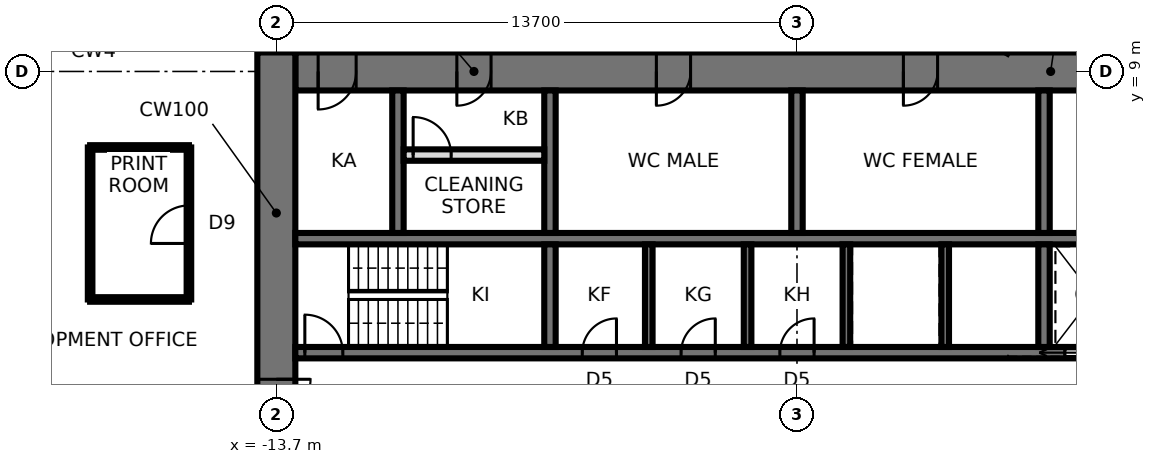
"""IFC4 building model, lengths in metres.
Left out: names, types, materials, properties, quantities, classifications, styles, units other than length and angle.
Written with IfcOpenShell. Run it as: python <this file> out.ifc"""

import sys

from ifc_helpers import new_model, si_unit, direction, frame, frame_2d, origin, place, context, subcontext, project, spatial, rectangle, extrude, element, fill, save


model = new_model("IFC4")
c1 = context("Model", 3, precision=1e-05, world=origin(), true_north=direction((0.0, 1.0)))
c2 = subcontext(c1, "Body", "Model", "MODEL_VIEW")
j1 = project(units=[si_unit("LENGTHUNIT", "METRE"), si_unit("PLANEANGLEUNIT", "RADIAN")], contexts=[c1])
p1 = place(None, origin())
s1 = spatial("IfcSite", under=j1, at=p1, CompositionType="ELEMENT")
p2 = place(p1, origin())
s2 = spatial("IfcBuilding", under=s1, at=p2, CompositionType="ELEMENT")
p3 = place(p2, frame((0.0, 0.0, 135.3)))
s3 = spatial("IfcBuildingStorey", under=s2, at=p3, CompositionType="ELEMENT", Elevation=135.3)
p4 = place(p3, frame((13.2, 9.0, 0.0), z_axis=(0.0, 0.0, 1.0), x_axis=(-1.0, 0.0, 0.0)))
e1 = element("IfcWall", 1, at=p4, inside=s3, PredefinedType="SHEAR", context=c2, shape_type="SweptSolid", body=[
    extrude(rectangle(XDim=26.4, YDim=1.0, at=frame_2d((13.2, 0.0))), origin(), (0.0, 0.0, 1.0), 3.9),
])
p5 = place(p4, frame((2.65, 0.0, 0.0)))
e2 = element("IfcOpeningElement", 2, at=p5, cuts=e1, PredefinedType="OPENING", context=c2, shape_type="SweptSolid", body=[
    extrude(rectangle(XDim=0.9, YDim=2.1, at=frame_2d((0.45, 1.05))), frame((0.0, 0.51, 0.0), z_axis=(0.0, -1.0, 0.0), x_axis=(1.0, 0.0, 0.0)), (0.0, 0.0, 1.0), 1.02),
])
p6 = place(p4, frame((9.5, 0.0, 0.0)))
e3 = element("IfcOpeningElement", 3, at=p6, cuts=e1, PredefinedType="OPENING", context=c2, shape_type="SweptSolid", body=[
    extrude(rectangle(XDim=0.9, YDim=2.1, at=frame_2d((0.45, 1.05))), frame((0.0, 0.51, 0.0), z_axis=(0.0, -1.0, 0.0), x_axis=(1.0, 0.0, 0.0)), (0.0, 0.0, 1.0), 1.02),
])
p7 = place(p4, frame((16.0, 0.0, 0.0)))
e4 = element("IfcOpeningElement", 4, at=p7, cuts=e1, PredefinedType="OPENING", context=c2, shape_type="SweptSolid", body=[
    extrude(rectangle(XDim=0.9, YDim=2.1, at=frame_2d((0.45, 1.05))), frame((0.0, 0.51, 0.0), z_axis=(0.0, -1.0, 0.0), x_axis=(1.0, 0.0, 0.0)), (0.0, 0.0, 1.0), 1.02),
])
p8 = place(p4, frame((21.25, 0.0, 0.0)))
e5 = element("IfcOpeningElement", 5, at=p8, cuts=e1, PredefinedType="OPENING", context=c2, shape_type="SweptSolid", body=[
    extrude(rectangle(XDim=0.9, YDim=2.1, at=frame_2d((0.45, 1.05))), frame((0.0, 0.51, 0.0), z_axis=(0.0, -1.0, 0.0), x_axis=(1.0, 0.0, 0.0)), (0.0, 0.0, 1.0), 1.02),
])
p9 = place(p4, frame((24.8, 0.0, 0.0)))
e6 = element("IfcOpeningElement", 6, at=p9, cuts=e1, PredefinedType="OPENING", context=c2, shape_type="SweptSolid", body=[
    extrude(rectangle(XDim=1.0, YDim=2.1, at=frame_2d((0.5, 1.05))), frame((0.0, 0.51, 0.0), z_axis=(0.0, -1.0, 0.0), x_axis=(1.0, 0.0, 0.0)), (0.0, 0.0, 1.0), 1.02),
])
p10 = place(p3, frame((-13.7, 9.5, 0.0), z_axis=(0.0, 0.0, 1.0), x_axis=(0.0, -1.0, 0.0)))
e7 = element("IfcWall", 7, at=p10, inside=s3, PredefinedType="SHEAR", context=c2, shape_type="SweptSolid", body=[
    extrude(rectangle(XDim=19.0, YDim=1.0, at=frame_2d((9.5, 0.0))), origin(), (0.0, 0.0, 1.0), 3.9),
])
p11 = place(p10, frame((8.6, 0.0, 0.0)))
e8 = element("IfcOpeningElement", 8, at=p11, cuts=e7, PredefinedType="OPENING", context=c2, shape_type="SweptSolid", body=[
    extrude(rectangle(XDim=1.8, YDim=2.4, at=frame_2d((0.9, 1.2))), frame((0.0, 0.51, 0.0), z_axis=(0.0, -1.0, 0.0), x_axis=(1.0, 0.0, 0.0)), (0.0, 0.0, 1.0), 1.02),
])
p12 = place(p3, frame((-13.2, 1.6, 0.0), z_axis=(0.0, 0.0, 1.0), x_axis=(1.0, 0.0, 0.0)))
e9 = element("IfcWall", 9, at=p12, inside=s3, PredefinedType="SHEAR", context=c2, shape_type="SweptSolid", body=[
    extrude(rectangle(XDim=26.4, YDim=0.3, at=frame_2d((13.2, 0.0))), origin(), (0.0, 0.0, 1.0), 3.9),
])
p13 = place(p12, frame((0.25, 0.0, 0.0)))
e10 = element("IfcOpeningElement", 10, at=p13, cuts=e9, PredefinedType="OPENING", context=c2, shape_type="SweptSolid", body=[
    extrude(rectangle(XDim=1.0, YDim=2.1, at=frame_2d((0.5, 1.05))), frame((0.0, 0.16, 0.0), z_axis=(0.0, -1.0, 0.0), x_axis=(1.0, 0.0, 0.0)), (0.0, 0.0, 1.0), 0.32),
])
p14 = place(p12, frame((20.25, 0.0, 0.0)))
e11 = element("IfcOpeningElement", 11, at=p14, cuts=e9, PredefinedType="OPENING", context=c2, shape_type="SweptSolid", body=[
    extrude(rectangle(XDim=1.5, YDim=2.4, at=frame_2d((0.75, 1.2))), frame((0.0, 0.16, 0.0), z_axis=(0.0, -1.0, 0.0), x_axis=(1.0, 0.0, 0.0)), (0.0, 0.0, 1.0), 0.32),
])
p15 = place(p12, frame((7.55, 0.0, 0.0)))
e12 = element("IfcOpeningElement", 12, at=p15, cuts=e9, PredefinedType="OPENING", context=c2, shape_type="SweptSolid", body=[
    extrude(rectangle(XDim=0.9, YDim=2.1, at=frame_2d((0.45, 1.05))), frame((0.0, 0.16, 0.0), z_axis=(0.0, -1.0, 0.0), x_axis=(1.0, 0.0, 0.0)), (0.0, 0.0, 1.0), 0.32),
])
p16 = place(p12, frame((10.15, 0.0, 0.0)))
e13 = element("IfcOpeningElement", 13, at=p16, cuts=e9, PredefinedType="OPENING", context=c2, shape_type="SweptSolid", body=[
    extrude(rectangle(XDim=0.9, YDim=2.1, at=frame_2d((0.45, 1.05))), frame((0.0, 0.16, 0.0), z_axis=(0.0, -1.0, 0.0), x_axis=(1.0, 0.0, 0.0)), (0.0, 0.0, 1.0), 0.32),
])
p17 = place(p12, frame((12.75, 0.0, 0.0)))
e14 = element("IfcOpeningElement", 14, at=p17, cuts=e9, PredefinedType="OPENING", context=c2, shape_type="SweptSolid", body=[
    extrude(rectangle(XDim=0.9, YDim=2.1, at=frame_2d((0.45, 1.05))), frame((0.0, 0.16, 0.0), z_axis=(0.0, -1.0, 0.0), x_axis=(1.0, 0.0, 0.0)), (0.0, 0.0, 1.0), 0.32),
])
p18 = place(p12, frame((24.15, 0.0, 0.0)))
e15 = element("IfcOpeningElement", 15, at=p18, cuts=e9, PredefinedType="OPENING", context=c2, shape_type="SweptSolid", body=[
    extrude(rectangle(XDim=0.9, YDim=2.1, at=frame_2d((0.45, 1.05))), frame((0.0, 0.16, 0.0), z_axis=(0.0, -1.0, 0.0), x_axis=(1.0, 0.0, 0.0)), (0.0, 0.0, 1.0), 0.32),
])
p19 = place(p3, frame((-13.2, 4.6, 0.0), z_axis=(0.0, 0.0, 1.0), x_axis=(1.0, 0.0, 0.0)))
e16 = element("IfcWall", 16, at=p19, inside=s3, PredefinedType="SHEAR", context=c2, shape_type="SweptSolid", body=[
    extrude(rectangle(XDim=26.4, YDim=0.3, at=frame_2d((13.2, 0.0))), origin(), (0.0, 0.0, 1.0), 3.9),
])
p20 = place(p3, frame((-6.5, 1.75, 0.0), z_axis=(0.0, 0.0, 1.0), x_axis=(0.0, 1.0, 0.0)))
e17 = element("IfcWall", 17, at=p20, inside=s3, PredefinedType="SHEAR", context=c2, shape_type="SweptSolid", body=[
    extrude(rectangle(XDim=2.7, YDim=0.3, at=frame_2d((1.35, 0.0))), origin(), (0.0, 0.0, 1.0), 3.9),
])
p21 = place(p3, frame((-6.5, 4.75, 0.0), z_axis=(0.0, 0.0, 1.0), x_axis=(0.0, 1.0, 0.0)))
e18 = element("IfcWall", 18, at=p21, inside=s3, PredefinedType="SHEAR", context=c2, shape_type="SweptSolid", body=[
    extrude(rectangle(XDim=3.75, YDim=0.3, at=frame_2d((1.875, 0.0))), origin(), (0.0, 0.0, 1.0), 3.9),
])
p22 = place(p3, frame((6.5, 1.75, 0.0), z_axis=(0.0, 0.0, 1.0), x_axis=(0.0, 1.0, 0.0)))
e19 = element("IfcWall", 19, at=p22, inside=s3, PredefinedType="SHEAR", context=c2, shape_type="SweptSolid", body=[
    extrude(rectangle(XDim=2.7, YDim=0.3, at=frame_2d((1.35, 0.0))), origin(), (0.0, 0.0, 1.0), 3.9),
])
p23 = place(p3, frame((6.5, 4.75, 0.0), z_axis=(0.0, 0.0, 1.0), x_axis=(0.0, 1.0, 0.0)))
e20 = element("IfcWall", 20, at=p23, inside=s3, PredefinedType="SHEAR", context=c2, shape_type="SweptSolid", body=[
    extrude(rectangle(XDim=3.75, YDim=0.3, at=frame_2d((1.875, 0.0))), origin(), (0.0, 0.0, 1.0), 3.9),
])
for number, where, z_axis, x_axis in (
    (21, (-3.9, 1.75, 0.0), (0.0, 0.0, 1.0), (0.0, 1.0, 0.0)),
    (22, (-1.3, 1.75, 0.0), (0.0, 0.0, 1.0), (0.0, 1.0, 0.0)),
    (23, (1.3, 1.75, 0.0), (0.0, 0.0, 1.0), (0.0, 1.0, 0.0)),
    (24, (3.9, 1.75, 0.0), (0.0, 0.0, 1.0), (0.0, 1.0, 0.0)),
):
    element("IfcWall", number, at=place(p3, frame(where, z_axis=z_axis, x_axis=x_axis)), inside=s3, PredefinedType="SHEAR", context=c2, shape_type="SweptSolid", body=[
        extrude(rectangle(XDim=2.7, YDim=0.2, at=frame_2d((1.35, 0.0))), origin(), (0.0, 0.0, 1.0), 3.9),
    ])
for number, where, z_axis, x_axis in (
    (25, (0.0, 4.75, 0.0), (0.0, 0.0, 1.0), (0.0, 1.0, 0.0)),
    (26, (-10.5, 4.75, 0.0), (0.0, 0.0, 1.0), (0.0, 1.0, 0.0)),
):
    element("IfcWall", number, at=place(p3, frame(where, z_axis=z_axis, x_axis=x_axis)), inside=s3, PredefinedType="SHEAR", context=c2, shape_type="SweptSolid", body=[
        extrude(rectangle(XDim=3.75, YDim=0.3, at=frame_2d((1.875, 0.0))), origin(), (0.0, 0.0, 1.0), 3.9),
    ])
p24 = place(p3, frame((-10.35, 6.8, 0.0), z_axis=(0.0, 0.0, 1.0), x_axis=(1.0, 0.0, 0.0)))
e27 = element("IfcWall", 27, at=p24, inside=s3, PredefinedType="PARTITIONING", context=c2, shape_type="SweptSolid", body=[
    extrude(rectangle(XDim=3.7, YDim=0.3, at=frame_2d((1.85, 0.0))), origin(), (0.0, 0.0, 1.0), 3.74),
])
p25 = place(p24, frame((0.25, 0.0, 0.0)))
e28 = element("IfcOpeningElement", 28, at=p25, cuts=e27, PredefinedType="OPENING", context=c2, shape_type="SweptSolid", body=[
    extrude(rectangle(XDim=1.0, YDim=2.4, at=frame_2d((0.5, 1.2))), frame((0.0, 0.16, 0.0), z_axis=(0.0, -1.0, 0.0), x_axis=(1.0, 0.0, 0.0)), (0.0, 0.0, 1.0), 0.32),
])
p26 = place(p3, frame((6.524, 11.3, 0.0), z_axis=(0.0, 0.0, 1.0), x_axis=(-0.499929208183, -0.866066271601, 0.0)))
e29 = element("IfcWall", 29, at=p26, inside=s3, PredefinedType="PARTITIONING", context=c2, shape_type="SweptSolid", body=[
    extrude(rectangle(XDim=2.078, YDim=0.12, at=frame_2d((1.039, 0.0))), origin(), (0.0, 0.0, 1.0), 3.74),
])
p27 = place(p3, frame((-18.6, 7.0, 0.0), z_axis=(0.0, 0.0, 1.0), x_axis=(1.0, 0.0, 0.0)))
e30 = element("IfcWall", 30, at=p27, inside=s3, PredefinedType="PARTITIONING", context=c2, shape_type="SweptSolid", body=[
    extrude(rectangle(XDim=2.6, YDim=0.12, at=frame_2d((1.3, 0.0))), origin(), (0.0, 0.0, 1.0), 3.74),
])
p28 = place(p3, frame((-16.0, 7.0, 0.0), z_axis=(0.0, 0.0, 1.0), x_axis=(0.0, -1.0, 0.0)))
e31 = element("IfcWall", 31, at=p28, inside=s3, PredefinedType="PARTITIONING", context=c2, shape_type="SweptSolid", body=[
    extrude(rectangle(XDim=4.0, YDim=0.12, at=frame_2d((2.0, 0.0))), origin(), (0.0, 0.0, 1.0), 3.74),
])
p29 = place(p28, frame((1.526, 0.0, 0.0)))
e32 = element("IfcOpeningElement", 32, at=p29, cuts=e31, PredefinedType="OPENING", context=c2, shape_type="SweptSolid", body=[
    extrude(rectangle(XDim=1.0, YDim=2.4, at=frame_2d((0.5, 1.2))), frame((0.0, 0.07, 0.0), z_axis=(0.0, -1.0, 0.0), x_axis=(1.0, 0.0, 0.0)), (0.0, 0.0, 1.0), 0.14),
])
p30 = place(p3, frame((-18.6, 3.0, 0.0), z_axis=(0.0, 0.0, 1.0), x_axis=(0.0, 1.0, 0.0)))
e33 = element("IfcWall", 33, at=p30, inside=s3, PredefinedType="PARTITIONING", context=c2, shape_type="SweptSolid", body=[
    extrude(rectangle(XDim=4.0, YDim=0.12, at=frame_2d((2.0, 0.0))), origin(), (0.0, 0.0, 1.0), 3.286),
])
p31 = place(p3, frame((-16.0, 3.0, 0.0), z_axis=(0.0, 0.0, 1.0), x_axis=(-1.0, 0.0, 0.0)))
e34 = element("IfcWall", 34, at=p31, inside=s3, PredefinedType="PARTITIONING", context=c2, shape_type="SweptSolid", body=[
    extrude(rectangle(XDim=2.6, YDim=0.12, at=frame_2d((1.3, 0.0))), origin(), (0.0, 0.0, 1.0), 3.74),
])
p32 = place(p11, origin())
e35 = element("IfcDoor", 35, at=p32, inside=s3, OperationType="DOUBLE_DOOR_SINGLE_SWING", PredefinedType="DOOR", context=c2, shape_type="SweptSolid", body=[
    extrude(rectangle(XDim=1.72, YDim=2.36, at=frame_2d((0.9, 1.18))), frame((0.0, 0.025, 0.0), z_axis=(0.0, -1.0, 0.0), x_axis=(1.0, 0.0, 0.0)), (0.0, 0.0, 1.0), 0.05),
    extrude(rectangle(XDim=0.04, YDim=2.4, at=frame_2d((0.02, 1.2))), frame((0.0, 0.25, 0.0), z_axis=(0.0, -1.0, 0.0), x_axis=(1.0, 0.0, 0.0)), (0.0, 0.0, 1.0), 0.5),
    extrude(rectangle(XDim=0.04, YDim=2.4, at=frame_2d((1.78, 1.2))), frame((0.0, 0.25, 0.0), z_axis=(0.0, -1.0, 0.0), x_axis=(1.0, 0.0, 0.0)), (0.0, 0.0, 1.0), 0.5),
    extrude(rectangle(XDim=1.72, YDim=0.04, at=frame_2d((0.9, 2.38))), frame((0.0, 0.25, 0.0), z_axis=(0.0, -1.0, 0.0), x_axis=(1.0, 0.0, 0.0)), (0.0, 0.0, 1.0), 0.5),
])
fill(e8, e35)
p33 = place(p13, origin())
e36 = element("IfcDoor", 36, at=p33, inside=s3, OperationType="SINGLE_SWING_LEFT", PredefinedType="DOOR", context=c2, shape_type="SweptSolid", body=[
    extrude(rectangle(XDim=1.0, YDim=2.1, at=frame_2d((0.5, 1.05))), frame((0.0, 0.025, 0.0), z_axis=(0.0, -1.0, 0.0), x_axis=(1.0, 0.0, 0.0)), (0.0, 0.0, 1.0), 0.05),
])
fill(e10, e36)
p34 = place(p14, origin())
e37 = element("IfcDoor", 37, at=p34, inside=s3, OperationType="SLIDING_TO_LEFT", PredefinedType="DOOR", context=c2, shape_type="SweptSolid", body=[
    extrude(rectangle(XDim=1.5, YDim=2.4, at=frame_2d((0.75, 1.2))), frame((0.0, 0.025, 0.0), z_axis=(0.0, -1.0, 0.0), x_axis=(1.0, 0.0, 0.0)), (0.0, 0.0, 1.0), 0.05),
])
fill(e11, e37)
p35 = place(p15, origin())
e38 = element("IfcDoor", 38, at=p35, inside=s3, OperationType="SINGLE_SWING_RIGHT", PredefinedType="DOOR", context=c2, shape_type="SweptSolid", body=[
    extrude(rectangle(XDim=0.9, YDim=2.1, at=frame_2d((0.45, 1.05))), frame((0.0, 0.025, 0.0), z_axis=(0.0, -1.0, 0.0), x_axis=(1.0, 0.0, 0.0)), (0.0, 0.0, 1.0), 0.05),
])
fill(e12, e38)
p36 = place(p16, origin())
e39 = element("IfcDoor", 39, at=p36, inside=s3, OperationType="SINGLE_SWING_RIGHT", PredefinedType="DOOR", context=c2, shape_type="SweptSolid", body=[
    extrude(rectangle(XDim=0.9, YDim=2.1, at=frame_2d((0.45, 1.05))), frame((0.0, 0.025, 0.0), z_axis=(0.0, -1.0, 0.0), x_axis=(1.0, 0.0, 0.0)), (0.0, 0.0, 1.0), 0.05),
])
fill(e13, e39)
p37 = place(p17, origin())
e40 = element("IfcDoor", 40, at=p37, inside=s3, OperationType="SINGLE_SWING_RIGHT", PredefinedType="DOOR", context=c2, shape_type="SweptSolid", body=[
    extrude(rectangle(XDim=0.9, YDim=2.1, at=frame_2d((0.45, 1.05))), frame((0.0, 0.025, 0.0), z_axis=(0.0, -1.0, 0.0), x_axis=(1.0, 0.0, 0.0)), (0.0, 0.0, 1.0), 0.05),
])
fill(e14, e40)
p38 = place(p6, origin())
e41 = element("IfcDoor", 41, at=p38, inside=s3, OperationType="SINGLE_SWING_RIGHT", PredefinedType="DOOR", context=c2, shape_type="SweptSolid", body=[
    extrude(rectangle(XDim=0.82, YDim=2.06, at=frame_2d((0.45, 1.03))), frame((0.0, 0.025, 0.0), z_axis=(0.0, -1.0, 0.0), x_axis=(1.0, 0.0, 0.0)), (0.0, 0.0, 1.0), 0.05),
    extrude(rectangle(XDim=0.04, YDim=2.1, at=frame_2d((0.02, 1.05))), frame((0.0, 0.25, 0.0), z_axis=(0.0, -1.0, 0.0), x_axis=(1.0, 0.0, 0.0)), (0.0, 0.0, 1.0), 0.5),
    extrude(rectangle(XDim=0.04, YDim=2.1, at=frame_2d((0.88, 1.05))), frame((0.0, 0.25, 0.0), z_axis=(0.0, -1.0, 0.0), x_axis=(1.0, 0.0, 0.0)), (0.0, 0.0, 1.0), 0.5),
    extrude(rectangle(XDim=0.82, YDim=0.04, at=frame_2d((0.45, 2.08))), frame((0.0, 0.25, 0.0), z_axis=(0.0, -1.0, 0.0), x_axis=(1.0, 0.0, 0.0)), (0.0, 0.0, 1.0), 0.5),
])
fill(e3, e41)
p39 = place(p7, origin())
e42 = element("IfcDoor", 42, at=p39, inside=s3, OperationType="SINGLE_SWING_RIGHT", PredefinedType="DOOR", context=c2, shape_type="SweptSolid", body=[
    extrude(rectangle(XDim=0.82, YDim=2.06, at=frame_2d((0.45, 1.03))), frame((0.0, 0.025, 0.0), z_axis=(0.0, -1.0, 0.0), x_axis=(1.0, 0.0, 0.0)), (0.0, 0.0, 1.0), 0.05),
    extrude(rectangle(XDim=0.04, YDim=2.1, at=frame_2d((0.02, 1.05))), frame((0.0, 0.25, 0.0), z_axis=(0.0, -1.0, 0.0), x_axis=(1.0, 0.0, 0.0)), (0.0, 0.0, 1.0), 0.5),
    extrude(rectangle(XDim=0.04, YDim=2.1, at=frame_2d((0.88, 1.05))), frame((0.0, 0.25, 0.0), z_axis=(0.0, -1.0, 0.0), x_axis=(1.0, 0.0, 0.0)), (0.0, 0.0, 1.0), 0.5),
    extrude(rectangle(XDim=0.82, YDim=0.04, at=frame_2d((0.45, 2.08))), frame((0.0, 0.25, 0.0), z_axis=(0.0, -1.0, 0.0), x_axis=(1.0, 0.0, 0.0)), (0.0, 0.0, 1.0), 0.5),
])
fill(e4, e42)
p40 = place(p8, origin())
e43 = element("IfcDoor", 43, at=p40, inside=s3, OperationType="SINGLE_SWING_RIGHT", PredefinedType="DOOR", context=c2, shape_type="SweptSolid", body=[
    extrude(rectangle(XDim=0.82, YDim=2.06, at=frame_2d((0.45, 1.03))), frame((0.0, 0.025, 0.0), z_axis=(0.0, -1.0, 0.0), x_axis=(1.0, 0.0, 0.0)), (0.0, 0.0, 1.0), 0.05),
    extrude(rectangle(XDim=0.04, YDim=2.1, at=frame_2d((0.02, 1.05))), frame((0.0, 0.25, 0.0), z_axis=(0.0, -1.0, 0.0), x_axis=(1.0, 0.0, 0.0)), (0.0, 0.0, 1.0), 0.5),
    extrude(rectangle(XDim=0.04, YDim=2.1, at=frame_2d((0.88, 1.05))), frame((0.0, 0.25, 0.0), z_axis=(0.0, -1.0, 0.0), x_axis=(1.0, 0.0, 0.0)), (0.0, 0.0, 1.0), 0.5),
    extrude(rectangle(XDim=0.82, YDim=0.04, at=frame_2d((0.45, 2.08))), frame((0.0, 0.25, 0.0), z_axis=(0.0, -1.0, 0.0), x_axis=(1.0, 0.0, 0.0)), (0.0, 0.0, 1.0), 0.5),
])
fill(e5, e43)
p41 = place(p9, origin())
e44 = element("IfcDoor", 44, at=p41, inside=s3, OperationType="SINGLE_SWING_RIGHT", PredefinedType="DOOR", context=c2, shape_type="SweptSolid", body=[
    extrude(rectangle(XDim=0.92, YDim=2.06, at=frame_2d((0.5, 1.03))), frame((0.0, 0.025, 0.0), z_axis=(0.0, -1.0, 0.0), x_axis=(1.0, 0.0, 0.0)), (0.0, 0.0, 1.0), 0.05),
    extrude(rectangle(XDim=0.04, YDim=2.1, at=frame_2d((0.02, 1.05))), frame((0.0, 0.25, 0.0), z_axis=(0.0, -1.0, 0.0), x_axis=(1.0, 0.0, 0.0)), (0.0, 0.0, 1.0), 0.5),
    extrude(rectangle(XDim=0.04, YDim=2.1, at=frame_2d((0.98, 1.05))), frame((0.0, 0.25, 0.0), z_axis=(0.0, -1.0, 0.0), x_axis=(1.0, 0.0, 0.0)), (0.0, 0.0, 1.0), 0.5),
    extrude(rectangle(XDim=0.92, YDim=0.04, at=frame_2d((0.5, 2.08))), frame((0.0, 0.25, 0.0), z_axis=(0.0, -1.0, 0.0), x_axis=(1.0, 0.0, 0.0)), (0.0, 0.0, 1.0), 0.5),
])
fill(e6, e44)
p42 = place(p25, origin())
e45 = element("IfcDoor", 45, at=p42, inside=s3, OperationType="SINGLE_SWING_LEFT", PredefinedType="DOOR", context=c2, shape_type="SweptSolid", body=[
    extrude(rectangle(XDim=1.0, YDim=2.4, at=frame_2d((0.5, 1.2))), frame((0.0, 0.025, 0.0), z_axis=(0.0, -1.0, 0.0), x_axis=(1.0, 0.0, 0.0)), (0.0, 0.0, 1.0), 0.05),
])
fill(e28, e45)
p43 = place(p29, frame((1.0, 0.0, 0.0), z_axis=(0.0, 0.0, 1.0), x_axis=(-1.0, 0.0, 0.0)))
e46 = element("IfcDoor", 46, at=p43, inside=s3, OperationType="SINGLE_SWING_LEFT", PredefinedType="DOOR", context=c2, shape_type="SweptSolid", body=[
    extrude(rectangle(XDim=1.0, YDim=2.4, at=frame_2d((0.5, 1.2))), frame((0.0, 0.025, 0.0), z_axis=(0.0, -1.0, 0.0), x_axis=(1.0, 0.0, 0.0)), (0.0, 0.0, 1.0), 0.05),
])
fill(e32, e46)
save(model, sys.argv[1])
